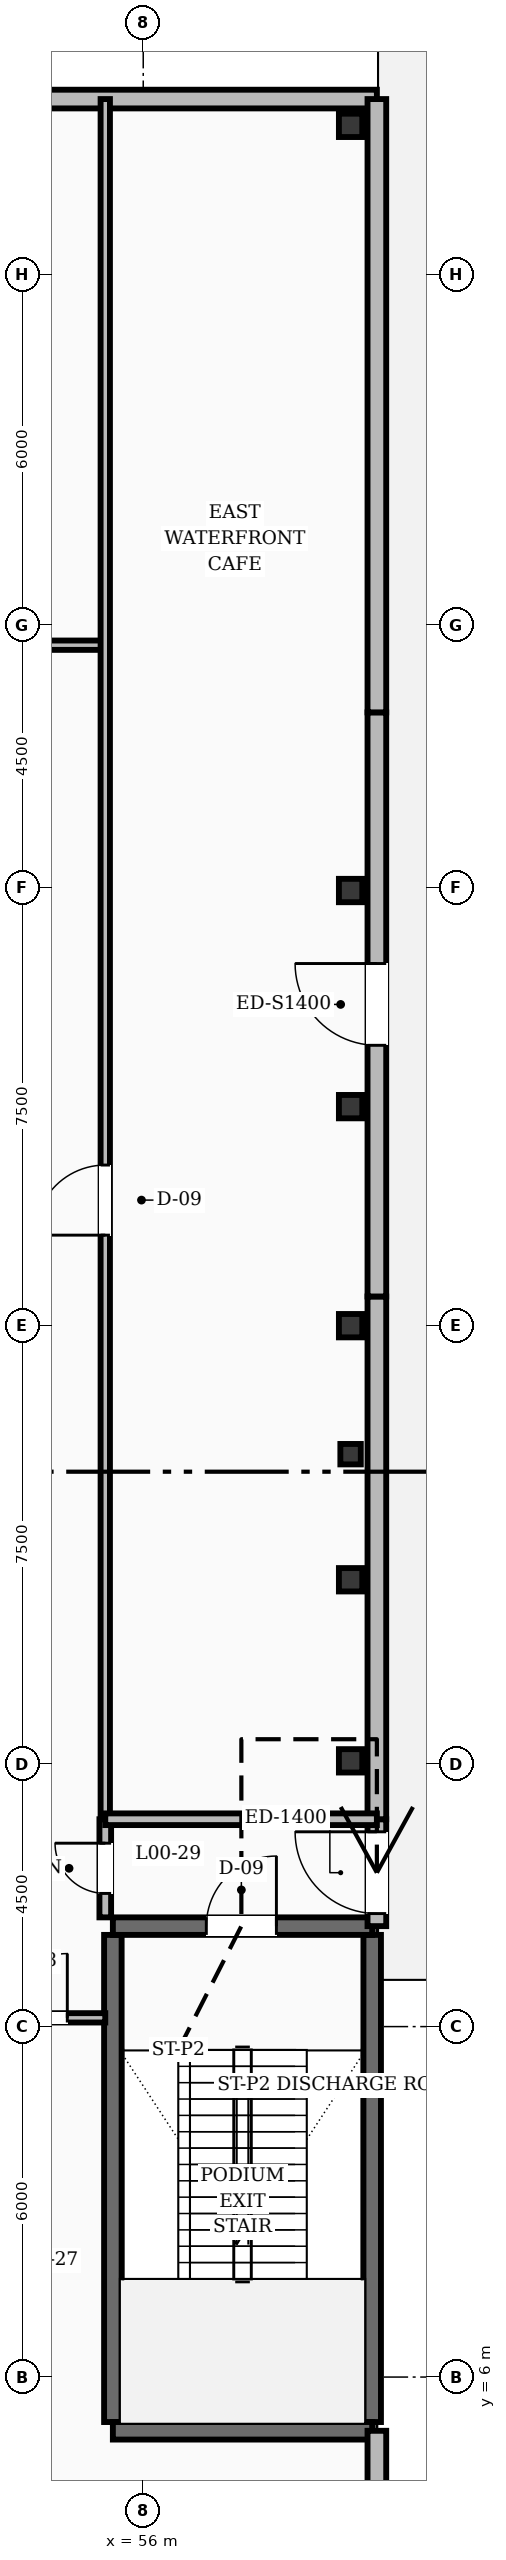
"""IFC4 building model, lengths in metres.
Left out: names, types, materials, properties, quantities, classifications, styles, units other than length and angle.
Written with IfcOpenShell. Run it as: python <this file> out.ifc"""

import sys

from ifc_helpers import new_model, si_unit, direction, frame, frame_2d, origin, origin_2d, place, context, subcontext, project, spatial, rectangle, hollow_rectangle, i_section, extrude, element, fill, save


model = new_model("IFC4")
c1 = context("Model", 3, precision=1e-05, world=origin(), true_north=direction((0.0, 1.0)))
c2 = subcontext(c1, "Body", "Model", "MODEL_VIEW")
j1 = project(units=[si_unit("LENGTHUNIT", "METRE"), si_unit("PLANEANGLEUNIT", "RADIAN")], contexts=[c1])
p1 = place(None, origin())
s1 = spatial("IfcSite", under=j1, at=p1, CompositionType="ELEMENT")
p2 = place(p1, origin())
s2 = spatial("IfcBuilding", under=s1, at=p2, CompositionType="ELEMENT")
p3 = place(p2, origin())
s3 = spatial("IfcBuildingStorey", under=s2, at=p3, CompositionType="ELEMENT", Elevation=0.0)
for number, where, z_axis, x_axis in (
    (1, (55.48, 5.23, 0.0), (0.0, 0.0, 1.0), (0.0, 1.0, 0.0)),
    (2, (59.92, 5.23, 0.0), (0.0, 0.0, 1.0), (0.0, 1.0, 0.0)),
):
    element("IfcWall", number, at=place(p3, frame(where, z_axis=z_axis, x_axis=x_axis)), inside=s3, PredefinedType="SHEAR", context=c2, shape_type="SweptSolid", body=[
        extrude(rectangle(XDim=8.34, YDim=0.3, at=frame_2d((4.17, 0.0))), origin(), (0.0, 0.0, 1.0), 5.2),
    ])
p4 = place(p3, frame((55.48, 5.08, 0.0), z_axis=(0.0, 0.0, 1.0), x_axis=(1.0, 0.0, 0.0)))
e3 = element("IfcWall", 3, at=p4, inside=s3, PredefinedType="SHEAR", context=c2, shape_type="SweptSolid", body=[
    extrude(rectangle(XDim=4.44, YDim=0.3, at=frame_2d((2.22, 0.0))), origin(), (0.0, 0.0, 1.0), 5.2),
])
p5 = place(p3, frame((55.48, 13.72, 0.0), z_axis=(0.0, 0.0, 1.0), x_axis=(1.0, 0.0, 0.0)))
e4 = element("IfcWall", 4, at=p5, inside=s3, PredefinedType="SHEAR", context=c2, shape_type="SweptSolid", body=[
    extrude(rectangle(XDim=4.44, YDim=0.3, at=frame_2d((2.22, 0.0))), origin(), (0.0, 0.0, 1.0), 5.2),
])
p6 = place(p5, frame((1.6, 0.0, 0.0)))
e5 = element("IfcOpeningElement", 5, at=p6, cuts=e4, PredefinedType="OPENING", context=c2, shape_type="SweptSolid", body=[
    extrude(rectangle(XDim=1.2, YDim=2.1, at=frame_2d((0.6, 1.05))), frame((0.0, 0.16, 0.0), z_axis=(0.0, -1.0, 0.0), x_axis=(1.0, 0.0, 0.0)), (0.0, 0.0, 1.0), 0.32),
])
for number, where, z_axis, x_axis in (
    (6, (59.55, 44.55, 0.0), (0.0, 0.0, 1.0), (1.0, 0.0, 0.0)),
    (7, (59.55, 16.55, 0.0), (0.0, 0.0, 1.0), (1.0, 0.0, 0.0)),
    (8, (59.55, 19.65, 0.0), (0.0, 0.0, 1.0), (1.0, 0.0, 0.0)),
    (9, (59.55, 24.0, 0.0), (0.0, 0.0, 1.0), (1.0, 0.0, 0.0)),
    (10, (59.55, 27.75, 0.0), (0.0, 0.0, 1.0), (1.0, 0.0, 0.0)),
    (11, (59.55, 31.45, 0.0), (0.0, 0.0, 1.0), (1.0, 0.0, 0.0)),
):
    element("IfcColumn", number, at=place(p3, frame(where, z_axis=z_axis, x_axis=x_axis)), inside=s3, PredefinedType="COLUMN", context=c2, shape_type="SweptSolid", body=[
        extrude(i_section(OverallWidth=0.4, OverallDepth=0.4, WebThickness=0.013, FlangeThickness=0.021, FilletRadius=0.018, at=origin_2d()), origin(), (0.0, 0.0, 1.0), 5.2),
    ])
p7 = place(p3, frame((59.55, 21.8, 0.0), z_axis=(0.0, 0.0, 1.0), x_axis=(1.0, 0.0, 0.0)))
e12 = element("IfcColumn", 12, at=p7, inside=s3, PredefinedType="PILASTER", context=c2, shape_type="SweptSolid", body=[
    extrude(hollow_rectangle(XDim=0.35, YDim=0.35, WallThickness=0.016, at=origin_2d()), origin(), (0.0, 0.0, 1.0), 5.2),
])
p8 = place(p3, frame((60.0, 45.0, 0.0), z_axis=(0.0, 0.0, 1.0), x_axis=(-1.0, 0.0, 0.0)))
e13 = element("IfcWall", 13, at=p8, inside=s3, PredefinedType="STANDARD", context=c2, shape_type="SweptSolid", body=[
    extrude(rectangle(XDim=8.0, YDim=0.32, at=frame_2d((4.0, 0.0))), origin(), (0.0, 0.0, 1.0), 3.97),
])
p9 = place(p3, frame((60.0, 3.0, 0.0), z_axis=(0.0, 0.0, 1.0), x_axis=(0.0, 1.0, 0.0)))
e14 = element("IfcWall", 14, at=p9, inside=s3, PredefinedType="STANDARD", context=c2, shape_type="SweptSolid", body=[
    extrude(rectangle(XDim=2.08, YDim=0.32, at=frame_2d((1.04, 0.0))), origin(), (0.0, 0.0, 1.0), 3.97),
])
p10 = place(p3, frame((60.0, 13.72, 0.0), z_axis=(0.0, 0.0, 1.0), x_axis=(0.0, 1.0, 0.0)))
e15 = element("IfcWall", 15, at=p10, inside=s3, PredefinedType="STANDARD", context=c2, shape_type="SweptSolid", body=[
    extrude(rectangle(XDim=1.83, YDim=0.32, at=frame_2d((0.915, 0.0))), origin(), (0.0, 0.0, 1.0), 3.97),
])
p11 = place(p10, frame((0.215, 0.0, 0.0)))
e16 = element("IfcOpeningElement", 16, at=p11, cuts=e15, PredefinedType="OPENING", context=c2, shape_type="SweptSolid", body=[
    extrude(rectangle(XDim=1.4, YDim=2.2, at=frame_2d((0.7, 1.1))), frame((0.0, 0.17, 0.0), z_axis=(0.0, -1.0, 0.0), x_axis=(1.0, 0.0, 0.0)), (0.0, 0.0, 1.0), 0.34),
])
p12 = place(p3, frame((60.0, 15.55, 0.0), z_axis=(0.0, 0.0, 1.0), x_axis=(0.0, 1.0, 0.0)))
e17 = element("IfcWall", 17, at=p12, inside=s3, PredefinedType="STANDARD", context=c2, shape_type="SweptSolid", body=[
    extrude(rectangle(XDim=8.95, YDim=0.32, at=frame_2d((4.475, 0.0))), origin(), (0.0, 0.0, 1.0), 3.97),
])
p13 = place(p3, frame((60.0, 24.5, 0.0), z_axis=(0.0, 0.0, 1.0), x_axis=(0.0, 1.0, 0.0)))
e18 = element("IfcWall", 18, at=p13, inside=s3, PredefinedType="STANDARD", context=c2, shape_type="SweptSolid", body=[
    extrude(rectangle(XDim=10.0, YDim=0.32, at=frame_2d((5.0, 0.0))), origin(), (0.0, 0.0, 1.0), 3.97),
])
p14 = place(p13, frame((4.3, 0.0, 0.0)))
e19 = element("IfcOpeningElement", 19, at=p14, cuts=e18, PredefinedType="OPENING", context=c2, shape_type="SweptSolid", body=[
    extrude(rectangle(XDim=1.4, YDim=2.25, at=frame_2d((0.7, 1.125))), frame((0.0, 0.17, 0.0), z_axis=(0.0, -1.0, 0.0), x_axis=(1.0, 0.0, 0.0)), (0.0, 0.0, 1.0), 0.34),
])
p15 = place(p3, frame((60.0, 34.5, 0.0), z_axis=(0.0, 0.0, 1.0), x_axis=(0.0, 1.0, 0.0)))
e20 = element("IfcWall", 20, at=p15, inside=s3, PredefinedType="STANDARD", context=c2, shape_type="SweptSolid", body=[
    extrude(rectangle(XDim=10.5, YDim=0.32, at=frame_2d((5.25, 0.0))), origin(), (0.0, 0.0, 1.0), 3.97),
])
p16 = place(p3, frame((55.35, 13.87, 0.0), z_axis=(0.0, 0.0, 1.0), x_axis=(0.0, 1.0, 0.0)))
e21 = element("IfcWall", 21, at=p16, inside=s3, PredefinedType="SOLIDWALL", context=c2, shape_type="SweptSolid", body=[
    extrude(rectangle(XDim=1.68, YDim=0.2, at=frame_2d((0.84, 0.0))), origin(), (0.0, 0.0, 1.0), 3.92),
])
p17 = place(p16, frame((0.41, 0.0, 0.0)))
e22 = element("IfcOpeningElement", 22, at=p17, cuts=e21, PredefinedType="OPENING", context=c2, shape_type="SweptSolid", body=[
    extrude(rectangle(XDim=0.86, YDim=2.1, at=frame_2d((0.43, 1.05))), frame((0.0, 0.11, 0.0), z_axis=(0.0, -1.0, 0.0), x_axis=(1.0, 0.0, 0.0)), (0.0, 0.0, 1.0), 0.22),
])
p18 = place(p3, frame((52.0, 35.65, 0.0), z_axis=(0.0, 0.0, 1.0), x_axis=(1.0, 0.0, 0.0)))
e23 = element("IfcWall", 23, at=p18, inside=s3, PredefinedType="SOLIDWALL", context=c2, shape_type="SweptSolid", body=[
    extrude(rectangle(XDim=3.35, YDim=0.16, at=frame_2d((1.675, 0.0))), origin(), (0.0, 0.0, 1.0), 3.92),
])
p19 = place(p3, frame((35.8, 12.15, 0.0), z_axis=(0.0, 0.0, 1.0), x_axis=(1.0, 0.0, 0.0)))
e24 = element("IfcWall", 24, at=p19, inside=s3, PredefinedType="SOLIDWALL", context=c2, shape_type="SweptSolid", body=[
    extrude(rectangle(XDim=19.55, YDim=0.16, at=frame_2d((9.775, 0.0))), origin(), (0.0, 0.0, 1.0), 3.92),
])
p20 = place(p19, frame((17.8, 0.0, 0.0)))
e25 = element("IfcOpeningElement", 25, at=p20, cuts=e24, PredefinedType="OPENING", context=c2, shape_type="SweptSolid", body=[
    extrude(rectangle(XDim=1.1, YDim=2.1, at=frame_2d((0.55, 1.05))), frame((0.0, 0.09, 0.0), z_axis=(0.0, -1.0, 0.0), x_axis=(1.0, 0.0, 0.0)), (0.0, 0.0, 1.0), 0.18),
])
p21 = place(p3, frame((55.35, 15.55, 0.0), z_axis=(0.0, 0.0, 1.0), x_axis=(0.0, 1.0, 0.0)))
e26 = element("IfcWall", 26, at=p21, inside=s3, PredefinedType="SOLIDWALL", context=c2, shape_type="SweptSolid", body=[
    extrude(rectangle(XDim=29.45, YDim=0.16, at=frame_2d((14.725, 0.0))), origin(), (0.0, 0.0, 1.0), 3.92),
])
p22 = place(p21, frame((10.0, 0.0, 0.0)))
e27 = element("IfcOpeningElement", 27, at=p22, cuts=e26, PredefinedType="OPENING", context=c2, shape_type="SweptSolid", body=[
    extrude(rectangle(XDim=1.2, YDim=2.1, at=frame_2d((0.6, 1.05))), frame((0.0, 0.09, 0.0), z_axis=(0.0, -1.0, 0.0), x_axis=(1.0, 0.0, 0.0)), (0.0, 0.0, 1.0), 0.18),
])
p23 = place(p3, frame((55.35, 15.55, 0.0), z_axis=(0.0, 0.0, 1.0), x_axis=(1.0, 0.0, 0.0)))
e28 = element("IfcWall", 28, at=p23, inside=s3, PredefinedType="SOLIDWALL", context=c2, shape_type="SweptSolid", body=[
    extrude(rectangle(XDim=4.65, YDim=0.2, at=frame_2d((2.325, 0.0))), origin(), (0.0, 0.0, 1.0), 3.92),
])
p24 = place(p11, frame((1.4, 0.0, 0.0), z_axis=(0.0, 0.0, 1.0), x_axis=(-1.0, 0.0, 0.0)))
e29 = element("IfcDoor", 29, at=p24, inside=s3, OperationType="SINGLE_SWING_RIGHT", PredefinedType="DOOR", context=c2, shape_type="SweptSolid", body=[
    extrude(rectangle(XDim=1.4, YDim=2.2, at=frame_2d((0.7, 1.1))), frame((0.0, 0.025, 0.0), z_axis=(0.0, -1.0, 0.0), x_axis=(1.0, 0.0, 0.0)), (0.0, 0.0, 1.0), 0.05),
])
fill(e16, e29)
p25 = place(p14, frame((1.4, 0.0, 0.0), z_axis=(0.0, 0.0, 1.0), x_axis=(-1.0, 0.0, 0.0)))
e30 = element("IfcDoor", 30, at=p25, inside=s3, OperationType="SINGLE_SWING_RIGHT", PredefinedType="DOOR", context=c2, shape_type="SweptSolid", body=[
    extrude(rectangle(XDim=1.4, YDim=2.25, at=frame_2d((0.7, 1.125))), frame((0.0, 0.025, 0.0), z_axis=(0.0, -1.0, 0.0), x_axis=(1.0, 0.0, 0.0)), (0.0, 0.0, 1.0), 0.05),
])
fill(e19, e30)
p26 = place(p6, origin())
e31 = element("IfcDoor", 31, at=p26, inside=s3, OperationType="SINGLE_SWING_RIGHT", PredefinedType="DOOR", context=c2, shape_type="SweptSolid", body=[
    extrude(rectangle(XDim=1.2, YDim=2.1, at=frame_2d((0.6, 1.05))), frame((0.0, 0.025, 0.0), z_axis=(0.0, -1.0, 0.0), x_axis=(1.0, 0.0, 0.0)), (0.0, 0.0, 1.0), 0.05),
])
fill(e5, e31)
p27 = place(p17, origin())
e32 = element("IfcDoor", 32, at=p27, inside=s3, OperationType="SINGLE_SWING_RIGHT", PredefinedType="DOOR", context=c2, shape_type="SweptSolid", body=[
    extrude(rectangle(XDim=0.86, YDim=2.1, at=frame_2d((0.43, 1.05))), frame((0.0, 0.025, 0.0), z_axis=(0.0, -1.0, 0.0), x_axis=(1.0, 0.0, 0.0)), (0.0, 0.0, 1.0), 0.05),
])
fill(e22, e32)
p28 = place(p20, origin())
e33 = element("IfcDoor", 33, at=p28, inside=s3, OperationType="SINGLE_SWING_RIGHT", PredefinedType="DOOR", context=c2, shape_type="SweptSolid", body=[
    extrude(rectangle(XDim=1.1, YDim=2.1, at=frame_2d((0.55, 1.05))), frame((0.0, 0.025, 0.0), z_axis=(0.0, -1.0, 0.0), x_axis=(1.0, 0.0, 0.0)), (0.0, 0.0, 1.0), 0.05),
])
fill(e25, e33)
p29 = place(p22, origin())
e34 = element("IfcDoor", 34, at=p29, inside=s3, OperationType="SINGLE_SWING_LEFT", PredefinedType="DOOR", context=c2, shape_type="SweptSolid", body=[
    extrude(rectangle(XDim=1.2, YDim=2.1, at=frame_2d((0.6, 1.05))), frame((0.0, 0.025, 0.0), z_axis=(0.0, -1.0, 0.0), x_axis=(1.0, 0.0, 0.0)), (0.0, 0.0, 1.0), 0.05),
])
fill(e27, e34)
save(model, sys.argv[1])
